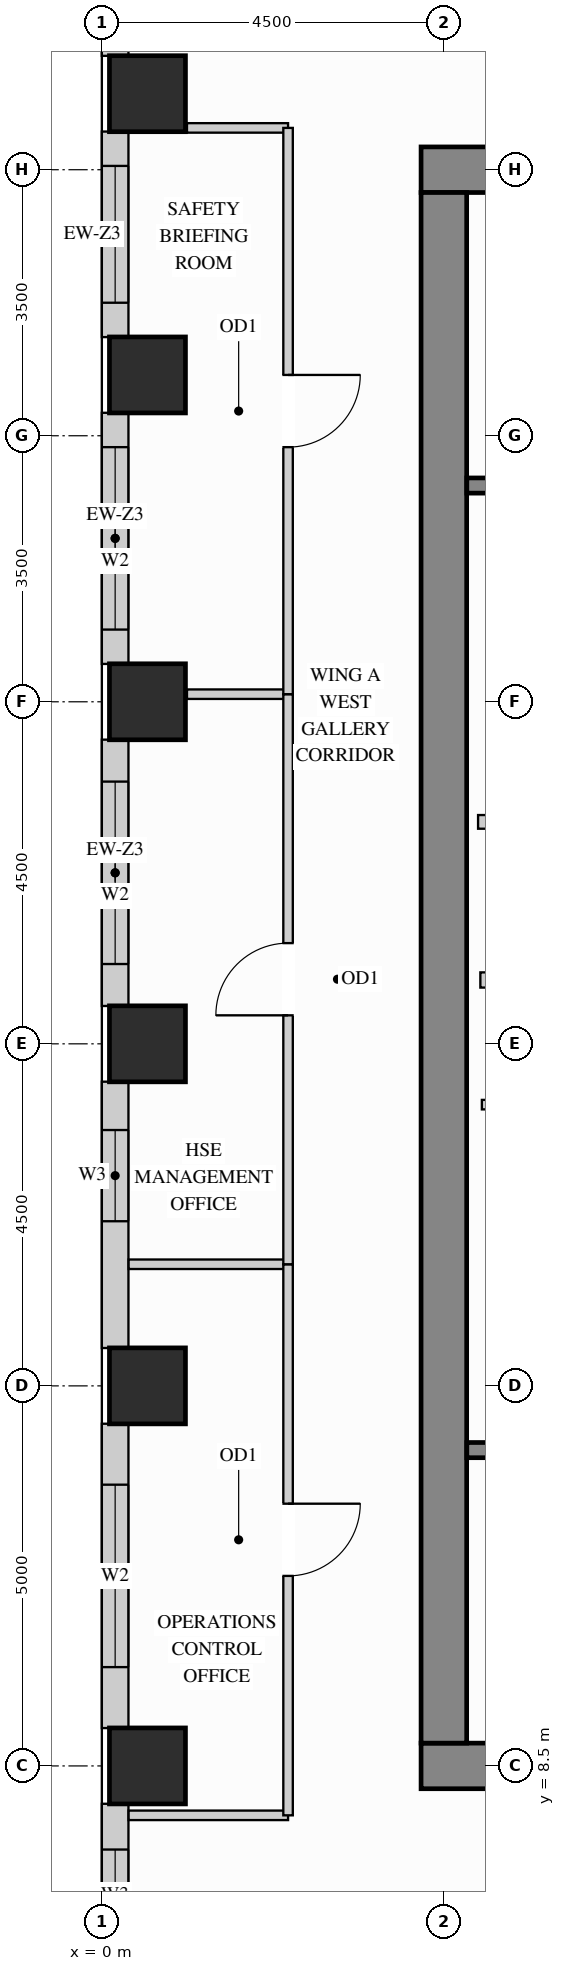
"""IFC4 building model, lengths in metres.
Left out: names, types, materials, properties, quantities, classifications, styles, units other than length and angle.
Written with IfcOpenShell. Run it as: python <this file> out.ifc"""

import sys

from ifc_helpers import new_model, si_unit, direction, frame, frame_2d, origin, origin_2d, place, context, subcontext, project, spatial, rectangle, extrude, source, transform, mapped, element, fill, save


model = new_model("IFC4")
c1 = context("Model", 3, precision=1e-05, world=origin(), true_north=direction((0.0, 1.0)))
c2 = subcontext(c1, "Body", "Model", "MODEL_VIEW")
j1 = project(units=[si_unit("LENGTHUNIT", "METRE"), si_unit("PLANEANGLEUNIT", "RADIAN")], contexts=[c1])
p1 = place(None, origin())
s1 = spatial("IfcSite", under=j1, at=p1, CompositionType="ELEMENT")
p2 = place(p1, origin())
s2 = spatial("IfcBuilding", under=s1, at=p2, CompositionType="ELEMENT")
p3 = place(p2, frame((0.0, 0.0, 182.7)))
s3 = spatial("IfcBuildingStorey", under=s2, at=p3, CompositionType="ELEMENT", Elevation=182.7)
m1 = source(origin(), c2, "Body", "SweptSolid", [
    extrude(rectangle(XDim=1.0, YDim=1.0, at=origin_2d()), origin(), (0.0, 0.0, 1.0), 3.4),
])
for number, where, z_axis, x_axis in (
    (1, (0.6, 13.5, 0.0), (0.0, 0.0, 1.0), (1.0, 0.0, 0.0)),
    (2, (0.6, 18.0, 0.0), (0.0, 0.0, 1.0), (1.0, 0.0, 0.0)),
    (3, (0.6, 22.5, 0.0), (0.0, 0.0, 1.0), (1.0, 0.0, 0.0)),
    (4, (0.6, 26.8, 0.0), (0.0, 0.0, 1.0), (1.0, 0.0, 0.0)),
    (5, (0.6, 30.5, 0.0), (0.0, 0.0, 1.0), (1.0, 0.0, 0.0)),
    (6, (0.6, 8.5, 0.0), (0.0, 0.0, 1.0), (1.0, 0.0, 0.0)),
):
    element("IfcColumn", number, at=place(p3, frame(where, z_axis=z_axis, x_axis=x_axis)), inside=s3, PredefinedType="COLUMN", context=c2, shape_type="MappedRepresentation", body=[
        mapped(m1, transform((0.0, 0.0, 0.0), x_axis=(1.0, 0.0, 0.0), y_axis=(0.0, 1.0, 0.0), z_axis=(0.0, 0.0, 1.0))),
    ])
m2 = source(origin(), c2, "Body", "SweptSolid", [
    extrude(rectangle(XDim=10.6, YDim=0.6, at=frame_2d((5.3, 0.0))), origin(), (0.0, 0.0, 1.0), 3.4),
])
for number, where, z_axis, x_axis in (
    (7, (4.2, 29.5, 0.0), (0.0, 0.0, 1.0), (1.0, 0.0, 0.0)),
    (8, (4.2, 8.5, 0.0), (0.0, 0.0, 1.0), (1.0, 0.0, 0.0)),
):
    element("IfcWall", number, at=place(p3, frame(where, z_axis=z_axis, x_axis=x_axis)), inside=s3, PredefinedType="SHEAR", context=c2, shape_type="MappedRepresentation", body=[
        mapped(m2, transform((0.0, 0.0, 0.0), x_axis=(1.0, 0.0, 0.0), y_axis=(0.0, 1.0, 0.0), z_axis=(0.0, 0.0, 1.0))),
    ])
m3 = source(origin(), c2, "Body", "SweptSolid", [
    extrude(rectangle(XDim=20.4, YDim=0.6, at=frame_2d((10.2, 0.0))), origin(), (0.0, 0.0, 1.0), 3.4),
])
p4 = place(p3, frame((4.5, 8.8, 0.0), z_axis=(0.0, 0.0, 1.0), x_axis=(0.0, 1.0, 0.0)))
e9 = element("IfcWall", 9, at=p4, inside=s3, PredefinedType="SHEAR", context=c2, shape_type="MappedRepresentation", body=[
    mapped(m3, transform((0.0, 0.0, 0.0), x_axis=(1.0, 0.0, 0.0), y_axis=(0.0, 1.0, 0.0), z_axis=(0.0, 0.0, 1.0))),
])
p5 = place(p3, frame((0.175, 34.502, 0.0), z_axis=(0.0, 0.0, 1.0), x_axis=(0.0, -1.0, 0.0)))
e10 = element("IfcWall", 10, at=p5, inside=s3, PredefinedType="SOLIDWALL", context=c2, shape_type="SweptSolid", body=[
    extrude(rectangle(XDim=3.504, YDim=0.35, at=frame_2d((1.752, 0.0))), origin(), (0.0, 0.0, 1.0), 2.612),
])
p6 = place(p5, frame((0.461, 0.0, 0.78)))
e11 = element("IfcOpeningElement", 11, at=p6, cuts=e10, PredefinedType="OPENING", context=c2, shape_type="SweptSolid", body=[
    extrude(rectangle(XDim=1.8, YDim=1.652, at=frame_2d((0.9, 0.826))), frame((0.0, 0.185, 0.0), z_axis=(0.0, -1.0, 0.0), x_axis=(1.0, 0.0, 0.0)), (0.0, 0.0, 1.0), 0.37),
])
p7 = place(p3, frame((0.175, 30.002, 0.0), z_axis=(0.0, 0.0, 1.0), x_axis=(0.0, -1.0, 0.0)))
e12 = element("IfcWall", 12, at=p7, inside=s3, PredefinedType="SOLIDWALL", context=c2, shape_type="SweptSolid", body=[
    extrude(rectangle(XDim=2.704, YDim=0.35, at=frame_2d((1.352, 0.0))), origin(), (0.0, 0.0, 1.0), 2.612),
])
p8 = place(p7, frame((0.452, 0.0, 0.78)))
e13 = element("IfcOpeningElement", 13, at=p8, cuts=e12, PredefinedType="OPENING", context=c2, shape_type="SweptSolid", body=[
    extrude(rectangle(XDim=1.8, YDim=1.652, at=frame_2d((0.9, 0.826))), frame((0.0, 0.185, 0.0), z_axis=(0.0, -1.0, 0.0), x_axis=(1.0, 0.0, 0.0)), (0.0, 0.0, 1.0), 0.37),
])
p9 = place(p3, frame((0.175, 26.302, 0.0), z_axis=(0.0, 0.0, 1.0), x_axis=(0.0, -1.0, 0.0)))
e14 = element("IfcWall", 14, at=p9, inside=s3, PredefinedType="SOLIDWALL", context=c2, shape_type="SweptSolid", body=[
    extrude(rectangle(XDim=3.304, YDim=0.35, at=frame_2d((1.652, 0.0))), origin(), (0.0, 0.0, 1.0), 2.612),
])
p10 = place(p9, frame((0.452, 0.0, 0.78)))
e15 = element("IfcOpeningElement", 15, at=p10, cuts=e14, PredefinedType="OPENING", context=c2, shape_type="SweptSolid", body=[
    extrude(rectangle(XDim=2.4, YDim=1.652, at=frame_2d((1.2, 0.826))), frame((0.0, 0.185, 0.0), z_axis=(0.0, -1.0, 0.0), x_axis=(1.0, 0.0, 0.0)), (0.0, 0.0, 1.0), 0.37),
])
p11 = place(p3, frame((0.175, 22.002, 0.0), z_axis=(0.0, 0.0, 1.0), x_axis=(0.0, -1.0, 0.0)))
e16 = element("IfcWall", 16, at=p11, inside=s3, PredefinedType="SOLIDWALL", context=c2, shape_type="SweptSolid", body=[
    extrude(rectangle(XDim=3.504, YDim=0.35, at=frame_2d((1.752, 0.0))), origin(), (0.0, 0.0, 1.0), 2.612),
])
p12 = place(p11, frame((0.552, 0.0, 0.78)))
e17 = element("IfcOpeningElement", 17, at=p12, cuts=e16, PredefinedType="OPENING", context=c2, shape_type="SweptSolid", body=[
    extrude(rectangle(XDim=2.4, YDim=1.652, at=frame_2d((1.2, 0.826))), frame((0.0, 0.185, 0.0), z_axis=(0.0, -1.0, 0.0), x_axis=(1.0, 0.0, 0.0)), (0.0, 0.0, 1.0), 0.37),
])
p13 = place(p3, frame((0.175, 17.502, 0.0), z_axis=(0.0, 0.0, 1.0), x_axis=(0.0, -1.0, 0.0)))
e18 = element("IfcWall", 18, at=p13, inside=s3, PredefinedType="SOLIDWALL", context=c2, shape_type="SweptSolid", body=[
    extrude(rectangle(XDim=3.504, YDim=0.35, at=frame_2d((1.752, 0.0))), origin(), (0.0, 0.0, 1.0), 2.612),
])
p14 = place(p13, frame((0.636, 0.0, 0.78)))
e19 = element("IfcOpeningElement", 19, at=p14, cuts=e18, PredefinedType="OPENING", context=c2, shape_type="SweptSolid", body=[
    extrude(rectangle(XDim=1.2, YDim=1.652, at=frame_2d((0.6, 0.826))), frame((0.0, 0.185, 0.0), z_axis=(0.0, -1.0, 0.0), x_axis=(1.0, 0.0, 0.0)), (0.0, 0.0, 1.0), 0.37),
])
p15 = place(p3, frame((0.175, 13.002, 0.0), z_axis=(0.0, 0.0, 1.0), x_axis=(0.0, -1.0, 0.0)))
e20 = element("IfcWall", 20, at=p15, inside=s3, PredefinedType="SOLIDWALL", context=c2, shape_type="SweptSolid", body=[
    extrude(rectangle(XDim=4.004, YDim=0.35, at=frame_2d((2.002, 0.0))), origin(), (0.0, 0.0, 1.0), 2.612),
])
p16 = place(p15, frame((0.802, 0.0, 0.78)))
e21 = element("IfcOpeningElement", 21, at=p16, cuts=e20, PredefinedType="OPENING", context=c2, shape_type="SweptSolid", body=[
    extrude(rectangle(XDim=2.4, YDim=1.652, at=frame_2d((1.2, 0.826))), frame((0.0, 0.185, 0.0), z_axis=(0.0, -1.0, 0.0), x_axis=(1.0, 0.0, 0.0)), (0.0, 0.0, 1.0), 0.37),
])
p17 = place(p3, frame((0.175, 8.002, 0.0), z_axis=(0.0, 0.0, 1.0), x_axis=(0.0, -1.0, 0.0)))
e22 = element("IfcWall", 22, at=p17, inside=s3, PredefinedType="SOLIDWALL", context=c2, shape_type="SweptSolid", body=[
    extrude(rectangle(XDim=4.004, YDim=0.35, at=frame_2d((2.002, 0.0))), origin(), (0.0, 0.0, 1.0), 2.612),
])
p18 = place(p17, frame((0.602, 0.0, 0.78)))
e23 = element("IfcOpeningElement", 23, at=p18, cuts=e22, PredefinedType="OPENING", context=c2, shape_type="SweptSolid", body=[
    extrude(rectangle(XDim=1.2, YDim=1.652, at=frame_2d((0.6, 0.826))), frame((0.0, 0.185, 0.0), z_axis=(0.0, -1.0, 0.0), x_axis=(1.0, 0.0, 0.0)), (0.0, 0.0, 1.0), 0.37),
])
m4 = source(origin(), c2, "Body", "SweptSolid", [
    extrude(rectangle(XDim=2.2, YDim=0.18, at=frame_2d((1.1, 0.0))), origin(), (0.0, 0.0, 1.0), 3.385),
])
p19 = place(p3, frame((4.95, 20.92, 0.0), z_axis=(0.0, 0.0, 1.0), x_axis=(1.0, 0.0, 0.0)))
e24 = element("IfcWall", 24, at=p19, inside=s3, PredefinedType="PARTITIONING", context=c2, shape_type="MappedRepresentation", body=[
    mapped(m4, transform((0.0, 0.0, 0.0), x_axis=(1.0, 0.0, 0.0), y_axis=(0.0, 1.0, 0.0), z_axis=(0.0, 0.0, 1.0))),
])
p20 = place(p3, frame((5.0, 17.2, 0.0), z_axis=(0.0, 0.0, 1.0), x_axis=(1.0, 0.0, 0.0)))
e25 = element("IfcWall", 25, at=p20, inside=s3, PredefinedType="PARTITIONING", context=c2, shape_type="SweptSolid", body=[
    extrude(rectangle(XDim=2.4, YDim=0.125, at=frame_2d((1.2, 0.0))), origin(), (0.0, 0.0, 1.0), 3.385),
])
p21 = place(p20, frame((0.7, 0.0, 0.0)))
e26 = element("IfcOpeningElement", 26, at=p21, cuts=e25, PredefinedType="OPENING", context=c2, shape_type="SweptSolid", body=[
    extrude(rectangle(XDim=0.85, YDim=2.1, at=frame_2d((0.425, 1.05))), frame((0.0, 0.073, 0.0), z_axis=(0.0, -1.0, 0.0), x_axis=(1.0, 0.0, 0.0)), (0.0, 0.0, 1.0), 0.145),
])
m5 = source(origin(), c2, "Body", "SweptSolid", [
    extrude(rectangle(XDim=1.33, YDim=0.125, at=frame_2d((0.665, 0.0))), origin(), (0.0, 0.0, 1.0), 3.385),
])
p22 = place(p3, frame((1.12, 30.05, 0.0), z_axis=(0.0, 0.0, 1.0), x_axis=(1.0, 0.0, 0.0)))
e27 = element("IfcWall", 27, at=p22, inside=s3, PredefinedType="PARTITIONING", context=c2, shape_type="MappedRepresentation", body=[
    mapped(m5, transform((0.0, 0.0, 0.0), x_axis=(1.0, 0.0, 0.0), y_axis=(0.0, 1.0, 0.0), z_axis=(0.0, 0.0, 1.0))),
])
m6 = source(origin(), c2, "Body", "SweptSolid", [
    extrude(rectangle(XDim=2.098, YDim=0.125, at=frame_2d((1.049, 0.0))), origin(), (0.0, 0.0, 1.0), 3.385),
])
for number, where, z_axis, x_axis in (
    (28, (0.352, 7.85, 0.0), (0.0, 0.0, 1.0), (1.0, 0.0, 0.0)),
    (29, (0.352, 15.1, 0.0), (0.0, 0.0, 1.0), (1.0, 0.0, 0.0)),
):
    element("IfcWall", number, at=place(p3, frame(where, z_axis=z_axis, x_axis=x_axis)), inside=s3, PredefinedType="PARTITIONING", context=c2, shape_type="MappedRepresentation", body=[
        mapped(m6, transform((0.0, 0.0, 0.0), x_axis=(1.0, 0.0, 0.0), y_axis=(0.0, 1.0, 0.0), z_axis=(0.0, 0.0, 1.0))),
    ])
p23 = place(p3, frame((1.12, 22.6, 0.0), z_axis=(0.0, 0.0, 1.0), x_axis=(1.0, 0.0, 0.0)))
e30 = element("IfcWall", 30, at=p23, inside=s3, PredefinedType="PARTITIONING", context=c2, shape_type="MappedRepresentation", body=[
    mapped(m5, transform((0.0, 0.0, 0.0), x_axis=(1.0, 0.0, 0.0), y_axis=(0.0, 1.0, 0.0), z_axis=(0.0, 0.0, 1.0))),
])
p24 = place(p3, frame((2.45, 7.85, 0.0), z_axis=(0.0, 0.0, 1.0), x_axis=(0.0, 1.0, 0.0)))
e31 = element("IfcWall", 31, at=p24, inside=s3, PredefinedType="PARTITIONING", context=c2, shape_type="SweptSolid", body=[
    extrude(rectangle(XDim=7.25, YDim=0.125, at=frame_2d((3.625, 0.0))), origin(), (0.0, 0.0, 1.0), 3.385),
])
p25 = place(p24, frame((3.15, 0.0, 0.0)))
e32 = element("IfcOpeningElement", 32, at=p25, cuts=e31, PredefinedType="OPENING", context=c2, shape_type="SweptSolid", body=[
    extrude(rectangle(XDim=0.95, YDim=2.15, at=frame_2d((0.475, 1.075))), frame((0.0, 0.073, 0.0), z_axis=(0.0, -1.0, 0.0), x_axis=(1.0, 0.0, 0.0)), (0.0, 0.0, 1.0), 0.145),
])
p26 = place(p3, frame((2.45, 15.1, 0.0), z_axis=(0.0, 0.0, 1.0), x_axis=(0.0, 1.0, 0.0)))
e33 = element("IfcWall", 33, at=p26, inside=s3, PredefinedType="PARTITIONING", context=c2, shape_type="SweptSolid", body=[
    extrude(rectangle(XDim=7.5, YDim=0.125, at=frame_2d((3.75, 0.0))), origin(), (0.0, 0.0, 1.0), 3.385),
])
p27 = place(p26, frame((3.275, 0.0, 0.0)))
e34 = element("IfcOpeningElement", 34, at=p27, cuts=e33, PredefinedType="OPENING", context=c2, shape_type="SweptSolid", body=[
    extrude(rectangle(XDim=0.95, YDim=2.15, at=frame_2d((0.475, 1.075))), frame((0.0, 0.073, 0.0), z_axis=(0.0, -1.0, 0.0), x_axis=(1.0, 0.0, 0.0)), (0.0, 0.0, 1.0), 0.145),
])
p28 = place(p3, frame((2.45, 22.6, 0.0), z_axis=(0.0, 0.0, 1.0), x_axis=(0.0, 1.0, 0.0)))
e35 = element("IfcWall", 35, at=p28, inside=s3, PredefinedType="PARTITIONING", context=c2, shape_type="SweptSolid", body=[
    extrude(rectangle(XDim=7.45, YDim=0.125, at=frame_2d((3.725, 0.0))), origin(), (0.0, 0.0, 1.0), 3.385),
])
p29 = place(p28, frame((3.25, 0.0, 0.0)))
e36 = element("IfcOpeningElement", 36, at=p29, cuts=e35, PredefinedType="OPENING", context=c2, shape_type="SweptSolid", body=[
    extrude(rectangle(XDim=0.95, YDim=2.15, at=frame_2d((0.475, 1.075))), frame((0.0, 0.073, 0.0), z_axis=(0.0, -1.0, 0.0), x_axis=(1.0, 0.0, 0.0)), (0.0, 0.0, 1.0), 0.145),
])
m7 = source(origin(), c2, "Body", "SweptSolid", [
    extrude(rectangle(XDim=2.09, YDim=0.2, at=frame_2d((1.045, 0.0))), origin(), (0.0, 0.0, 1.0), 3.385),
])
p30 = place(p3, frame((4.98, 18.84, 0.0), z_axis=(0.0, 0.0, 1.0), x_axis=(1.0, 0.0, 0.0)))
e37 = element("IfcWall", 37, at=p30, inside=s3, PredefinedType="PARTITIONING", context=c2, shape_type="MappedRepresentation", body=[
    mapped(m7, transform((0.0, 0.0, 0.0), x_axis=(1.0, 0.0, 0.0), y_axis=(0.0, 1.0, 0.0), z_axis=(0.0, 0.0, 1.0))),
])
p31 = place(p3, frame((4.802, 12.655, 0.0), z_axis=(0.0, 0.0, 1.0), x_axis=(1.0, 0.0, 0.0)))
e38 = element("IfcWall", 38, at=p31, inside=s3, PredefinedType="SHEAR", context=c2, shape_type="SweptSolid", body=[
    extrude(rectangle(XDim=7.603, YDim=0.2, at=frame_2d((3.802, 0.0))), origin(), (0.0, 0.0, 1.0), 3.4),
])
p32 = place(p31, frame((0.4, 0.0, 0.0)))
e39 = element("IfcOpeningElement", 39, at=p32, cuts=e38, PredefinedType="OPENING", context=c2, shape_type="SweptSolid", body=[
    extrude(rectangle(XDim=1.1, YDim=2.15, at=frame_2d((0.55, 1.075))), frame((0.0, 0.11, 0.0), z_axis=(0.0, -1.0, 0.0), x_axis=(1.0, 0.0, 0.0)), (0.0, 0.0, 1.0), 0.22),
])
p33 = place(p3, frame((4.802, 25.345, 0.0), z_axis=(0.0, 0.0, 1.0), x_axis=(1.0, 0.0, 0.0)))
e40 = element("IfcWall", 40, at=p33, inside=s3, PredefinedType="SHEAR", context=c2, shape_type="SweptSolid", body=[
    extrude(rectangle(XDim=7.603, YDim=0.2, at=frame_2d((3.802, 0.0))), origin(), (0.0, 0.0, 1.0), 3.4),
])
p34 = place(p33, frame((0.4, 0.0, 0.0)))
e41 = element("IfcOpeningElement", 41, at=p34, cuts=e40, PredefinedType="OPENING", context=c2, shape_type="SweptSolid", body=[
    extrude(rectangle(XDim=1.1, YDim=2.15, at=frame_2d((0.55, 1.075))), frame((0.0, 0.11, 0.0), z_axis=(0.0, -1.0, 0.0), x_axis=(1.0, 0.0, 0.0)), (0.0, 0.0, 1.0), 0.22),
])
m8 = source(origin(), c2, "Body", "SweptSolid", [
    extrude(rectangle(XDim=0.95, YDim=2.15, at=frame_2d((0.475, 1.075))), frame((0.0, 0.025, 0.0), z_axis=(0.0, -1.0, 0.0), x_axis=(1.0, 0.0, 0.0)), (0.0, 0.0, 1.0), 0.05),
])
p35 = place(p25, origin())
e42 = element("IfcDoor", 42, at=p35, inside=s3, OperationType="SINGLE_SWING_RIGHT", PredefinedType="DOOR", context=c2, shape_type="MappedRepresentation", body=[
    mapped(m8, transform((0.0, 0.0, 0.0), x_axis=(1.0, 0.0, 0.0), y_axis=(0.0, 1.0, 0.0), z_axis=(0.0, 0.0, 1.0))),
])
fill(e32, e42)
p36 = place(p27, origin())
e43 = element("IfcDoor", 43, at=p36, inside=s3, OperationType="SINGLE_SWING_LEFT", PredefinedType="DOOR", context=c2, shape_type="MappedRepresentation", body=[
    mapped(m8, transform((0.0, 0.0, 0.0), x_axis=(1.0, 0.0, 0.0), y_axis=(0.0, 1.0, 0.0), z_axis=(0.0, 0.0, 1.0))),
])
fill(e34, e43)
p37 = place(p29, origin())
e44 = element("IfcDoor", 44, at=p37, inside=s3, OperationType="SINGLE_SWING_RIGHT", PredefinedType="DOOR", context=c2, shape_type="MappedRepresentation", body=[
    mapped(m8, transform((0.0, 0.0, 0.0), x_axis=(1.0, 0.0, 0.0), y_axis=(0.0, 1.0, 0.0), z_axis=(0.0, 0.0, 1.0))),
])
fill(e36, e44)
m9 = source(origin(), c2, "Body", "SweptSolid", [
    extrude(rectangle(XDim=1.8, YDim=1.652, at=frame_2d((0.9, 0.826))), frame((0.0, 0.03, 0.0), z_axis=(0.0, -1.0, 0.0), x_axis=(1.0, 0.0, 0.0)), (0.0, 0.0, 1.0), 0.06),
])
p38 = place(p8, origin())
e45 = element("IfcWindow", 45, at=p38, inside=s3, PartitioningType="SINGLE_PANEL", PredefinedType="WINDOW", context=c2, shape_type="MappedRepresentation", body=[
    mapped(m9, transform((0.0, 0.0, 0.0), x_axis=(1.0, 0.0, 0.0), y_axis=(0.0, 1.0, 0.0), z_axis=(0.0, 0.0, 1.0))),
])
fill(e13, e45)
m10 = source(origin(), c2, "Body", "SweptSolid", [
    extrude(rectangle(XDim=2.4, YDim=1.652, at=frame_2d((1.2, 0.826))), frame((0.0, 0.03, 0.0), z_axis=(0.0, -1.0, 0.0), x_axis=(1.0, 0.0, 0.0)), (0.0, 0.0, 1.0), 0.06),
])
p39 = place(p10, origin())
e46 = element("IfcWindow", 46, at=p39, inside=s3, PartitioningType="SINGLE_PANEL", PredefinedType="WINDOW", context=c2, shape_type="MappedRepresentation", body=[
    mapped(m10, transform((0.0, 0.0, 0.0), x_axis=(1.0, 0.0, 0.0), y_axis=(0.0, 1.0, 0.0), z_axis=(0.0, 0.0, 1.0))),
])
fill(e15, e46)
p40 = place(p12, origin())
e47 = element("IfcWindow", 47, at=p40, inside=s3, PartitioningType="SINGLE_PANEL", PredefinedType="WINDOW", context=c2, shape_type="MappedRepresentation", body=[
    mapped(m10, transform((0.0, 0.0, 0.0), x_axis=(1.0, 0.0, 0.0), y_axis=(0.0, 1.0, 0.0), z_axis=(0.0, 0.0, 1.0))),
])
fill(e17, e47)
p41 = place(p16, origin())
e48 = element("IfcWindow", 48, at=p41, inside=s3, PartitioningType="SINGLE_PANEL", PredefinedType="WINDOW", context=c2, shape_type="MappedRepresentation", body=[
    mapped(m10, transform((0.0, 0.0, 0.0), x_axis=(1.0, 0.0, 0.0), y_axis=(0.0, 1.0, 0.0), z_axis=(0.0, 0.0, 1.0))),
])
fill(e21, e48)
m11 = source(origin(), c2, "Body", "SweptSolid", [
    extrude(rectangle(XDim=1.2, YDim=1.652, at=frame_2d((0.6, 0.826))), frame((0.0, 0.03, 0.0), z_axis=(0.0, -1.0, 0.0), x_axis=(1.0, 0.0, 0.0)), (0.0, 0.0, 1.0), 0.06),
])
p42 = place(p14, origin())
e49 = element("IfcWindow", 49, at=p42, inside=s3, PartitioningType="SINGLE_PANEL", PredefinedType="WINDOW", context=c2, shape_type="MappedRepresentation", body=[
    mapped(m11, transform((0.0, 0.0, 0.0), x_axis=(1.0, 0.0, 0.0), y_axis=(0.0, 1.0, 0.0), z_axis=(0.0, 0.0, 1.0))),
])
fill(e19, e49)
p43 = place(p18, origin())
e50 = element("IfcWindow", 50, at=p43, inside=s3, PartitioningType="SINGLE_PANEL", PredefinedType="WINDOW", context=c2, shape_type="MappedRepresentation", body=[
    mapped(m11, transform((0.0, 0.0, 0.0), x_axis=(1.0, 0.0, 0.0), y_axis=(0.0, 1.0, 0.0), z_axis=(0.0, 0.0, 1.0))),
])
fill(e23, e50)
save(model, sys.argv[1])
